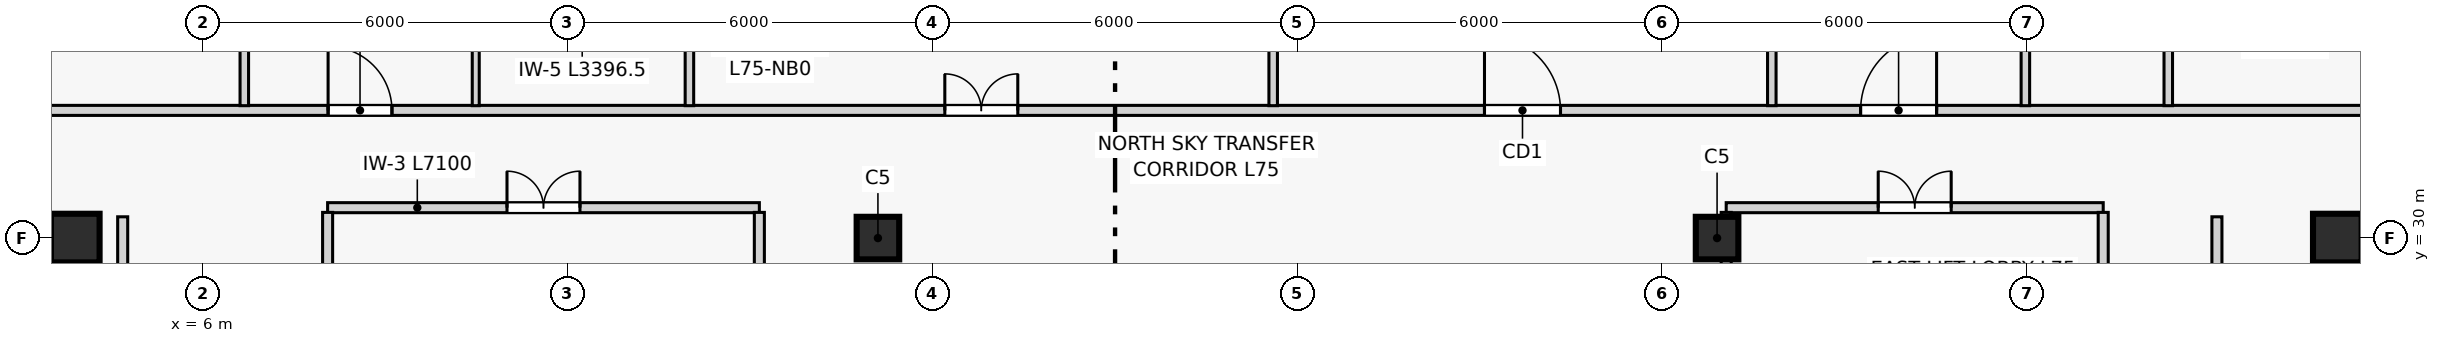
"""IFC4 building model, lengths in metres.
Left out: names, types, materials, properties, quantities, classifications, styles, units other than length and angle.
Written with IfcOpenShell. Run it as: python <this file> out.ifc"""

import sys

from ifc_helpers import new_model, si_unit, direction, frame, frame_2d, origin, origin_2d, place, context, subcontext, project, spatial, rectangle, extrude, source, transform, mapped, element, fill, save


model = new_model("IFC4")
c1 = context("Model", 3, precision=1e-05, world=origin(), true_north=direction((0.0, 1.0)))
c2 = subcontext(c1, "Body", "Model", "MODEL_VIEW")
j1 = project(units=[si_unit("LENGTHUNIT", "METRE"), si_unit("PLANEANGLEUNIT", "RADIAN")], contexts=[c1])
p1 = place(None, origin())
s1 = spatial("IfcSite", under=j1, at=p1, CompositionType="ELEMENT")
p2 = place(p1, origin())
s2 = spatial("IfcBuilding", under=s1, at=p2, CompositionType="ELEMENT")
p3 = place(p2, frame((0.0, 0.0, 285.3)))
s3 = spatial("IfcBuildingStorey", under=s2, at=p3, CompositionType="ELEMENT", Elevation=285.3)
m1 = source(origin(), c2, "Body", "SweptSolid", [
    extrude(rectangle(XDim=0.8, YDim=0.8, at=origin_2d()), origin(), (0.0, 0.0, 1.0), 4.2),
])
for number, where, z_axis, x_axis in (
    (1, (3.9, 30.0, 0.0), (0.0, 0.0, 1.0), (1.0, 0.0, 0.0)),
    (2, (41.1, 30.0, 0.0), (0.0, 0.0, 1.0), (1.0, 0.0, 0.0)),
):
    element("IfcColumn", number, at=place(p3, frame(where, z_axis=z_axis, x_axis=x_axis)), inside=s3, PredefinedType="COLUMN", context=c2, shape_type="MappedRepresentation", body=[
        mapped(m1, transform((0.0, 0.0, 0.0), scale=1.0)),
    ])
m2 = source(origin(), c2, "Body", "SweptSolid", [
    extrude(rectangle(XDim=0.7, YDim=0.7, at=origin_2d()), origin(), (0.0, 0.0, 1.0), 4.2),
])
for number, where, z_axis, x_axis in (
    (3, (17.1, 30.0, 0.0), (0.0, 0.0, 1.0), (1.0, 0.0, 0.0)),
    (4, (30.9, 30.0, 0.0), (0.0, 0.0, 1.0), (1.0, 0.0, 0.0)),
):
    element("IfcColumn", number, at=place(p3, frame(where, z_axis=z_axis, x_axis=x_axis)), inside=s3, PredefinedType="COLUMN", context=c2, shape_type="MappedRepresentation", body=[
        mapped(m2, transform((0.0, 0.0, 0.0), scale=1.0)),
    ])
p4 = place(p3, frame((8.05, 30.5, 0.0), z_axis=(0.0, 0.0, 1.0), x_axis=(1.0, 0.0, 0.0)))
e5 = element("IfcWall", 5, at=p4, inside=s3, PredefinedType="PARTITIONING", context=c2, shape_type="SweptSolid", body=[
    extrude(rectangle(XDim=7.1, YDim=0.165, at=frame_2d((3.55, 0.0))), origin(), (0.0, 0.0, 1.0), 3.92),
])
p5 = place(p4, frame((2.95, 0.0, 0.0)))
e6 = element("IfcOpeningElement", 6, at=p5, cuts=e5, PredefinedType="OPENING", context=c2, shape_type="SweptSolid", body=[
    extrude(rectangle(XDim=1.2, YDim=2.2, at=frame_2d((0.6, 1.1))), frame((0.0, 0.093, 0.0), z_axis=(0.0, -1.0, 0.0), x_axis=(1.0, 0.0, 0.0)), (0.0, 0.0, 1.0), 0.185),
])
for number, where, z_axis, x_axis in (
    (7, (8.05, 27.27, 0.0), (0.0, 0.0, 1.0), (0.0, 1.0, 0.0)),
    (8, (15.15, 27.27, 0.0), (0.0, 0.0, 1.0), (0.0, 1.0, 0.0)),
):
    element("IfcWall", number, at=place(p3, frame(where, z_axis=z_axis, x_axis=x_axis)), inside=s3, PredefinedType="PARTITIONING", context=c2, shape_type="SweptSolid", body=[
        extrude(rectangle(XDim=3.153, YDim=0.165, at=frame_2d((1.576, 0.0))), origin(), (0.0, 0.0, 1.0), 3.92),
    ])
p6 = place(p3, frame((31.05, 30.5, 0.0), z_axis=(0.0, 0.0, 1.0), x_axis=(1.0, 0.0, 0.0)))
e9 = element("IfcWall", 9, at=p6, inside=s3, PredefinedType="PARTITIONING", context=c2, shape_type="SweptSolid", body=[
    extrude(rectangle(XDim=6.2, YDim=0.165, at=frame_2d((3.1, 0.0))), origin(), (0.0, 0.0, 1.0), 3.92),
])
p7 = place(p6, frame((2.5, 0.0, 0.0)))
e10 = element("IfcOpeningElement", 10, at=p7, cuts=e9, PredefinedType="OPENING", context=c2, shape_type="SweptSolid", body=[
    extrude(rectangle(XDim=1.2, YDim=2.2, at=frame_2d((0.6, 1.1))), frame((0.0, 0.093, 0.0), z_axis=(0.0, -1.0, 0.0), x_axis=(1.0, 0.0, 0.0)), (0.0, 0.0, 1.0), 0.185),
])
for number, where, z_axis, x_axis in (
    (11, (31.05, 27.27, 0.0), (0.0, 0.0, 1.0), (0.0, 1.0, 0.0)),
    (12, (37.25, 27.27, 0.0), (0.0, 0.0, 1.0), (0.0, 1.0, 0.0)),
):
    element("IfcWall", number, at=place(p3, frame(where, z_axis=z_axis, x_axis=x_axis)), inside=s3, PredefinedType="PARTITIONING", context=c2, shape_type="SweptSolid", body=[
        extrude(rectangle(XDim=3.153, YDim=0.165, at=frame_2d((1.576, 0.0))), origin(), (0.0, 0.0, 1.0), 3.92),
    ])
p8 = place(p3, frame((3.145, 32.1, 0.0), z_axis=(0.0, 0.0, 1.0), x_axis=(1.0, 0.0, 0.0)))
e13 = element("IfcWall", 13, at=p8, inside=s3, PredefinedType="PARTITIONING", context=c2, shape_type="SweptSolid", body=[
    extrude(rectangle(XDim=38.71, YDim=0.165, at=frame_2d((19.355, 0.0))), origin(), (0.0, 0.0, 1.0), 3.92),
])
p9 = place(p8, frame((4.913, 0.0, 0.0)))
e14 = element("IfcOpeningElement", 14, at=p9, cuts=e13, PredefinedType="OPENING", context=c2, shape_type="SweptSolid", body=[
    extrude(rectangle(XDim=1.05, YDim=2.15, at=frame_2d((0.525, 1.075))), frame((0.0, 0.093, 0.0), z_axis=(0.0, -1.0, 0.0), x_axis=(1.0, 0.0, 0.0)), (0.0, 0.0, 1.0), 0.185),
])
p10 = place(p8, frame((15.055, 0.0, 0.0)))
e15 = element("IfcOpeningElement", 15, at=p10, cuts=e13, PredefinedType="OPENING", context=c2, shape_type="SweptSolid", body=[
    extrude(rectangle(XDim=1.2, YDim=2.2, at=frame_2d((0.6, 1.1))), frame((0.0, 0.093, 0.0), z_axis=(0.0, -1.0, 0.0), x_axis=(1.0, 0.0, 0.0)), (0.0, 0.0, 1.0), 0.185),
])
p11 = place(p8, frame((23.93, 0.0, 0.0)))
e16 = element("IfcOpeningElement", 16, at=p11, cuts=e13, PredefinedType="OPENING", context=c2, shape_type="SweptSolid", body=[
    extrude(rectangle(XDim=1.25, YDim=2.2, at=frame_2d((0.625, 1.1))), frame((0.0, 0.093, 0.0), z_axis=(0.0, -1.0, 0.0), x_axis=(1.0, 0.0, 0.0)), (0.0, 0.0, 1.0), 0.185),
])
p12 = place(p8, frame((30.115, 0.0, 0.0)))
e17 = element("IfcOpeningElement", 17, at=p12, cuts=e13, PredefinedType="OPENING", context=c2, shape_type="SweptSolid", body=[
    extrude(rectangle(XDim=1.25, YDim=2.2, at=frame_2d((0.625, 1.1))), frame((0.0, 0.093, 0.0), z_axis=(0.0, -1.0, 0.0), x_axis=(1.0, 0.0, 0.0)), (0.0, 0.0, 1.0), 0.185),
])
p13 = place(p3, frame((4.68, 26.45, 0.0), z_axis=(0.0, 0.0, 1.0), x_axis=(0.0, 1.0, 0.0)))
e18 = element("IfcWall", 18, at=p13, inside=s3, PredefinedType="PARTITIONING", context=c2, shape_type="SweptSolid", body=[
    extrude(rectangle(XDim=3.9, YDim=0.165, at=frame_2d((1.95, 0.0))), origin(), (0.0, 0.0, 1.0), 3.92),
])
p14 = place(p13, frame((1.475, 0.0, 0.0)))
e19 = element("IfcOpeningElement", 19, at=p14, cuts=e18, PredefinedType="OPENING", context=c2, shape_type="SweptSolid", body=[
    extrude(rectangle(XDim=0.95, YDim=2.1, at=frame_2d((0.475, 1.05))), frame((0.0, 0.093, 0.0), z_axis=(0.0, -1.0, 0.0), x_axis=(1.0, 0.0, 0.0)), (0.0, 0.0, 1.0), 0.185),
])
p15 = place(p3, frame((39.12, 11.45, 0.0), z_axis=(0.0, 0.0, 1.0), x_axis=(0.0, 1.0, 0.0)))
e20 = element("IfcWall", 20, at=p15, inside=s3, PredefinedType="PARTITIONING", context=c2, shape_type="SweptSolid", body=[
    extrude(rectangle(XDim=18.9, YDim=0.165, at=frame_2d((9.45, 0.0))), origin(), (0.0, 0.0, 1.0), 3.92),
])
p16 = place(p15, frame((2.05, 0.0, 0.0)))
e21 = element("IfcOpeningElement", 21, at=p16, cuts=e20, PredefinedType="OPENING", context=c2, shape_type="SweptSolid", body=[
    extrude(rectangle(XDim=0.95, YDim=2.1, at=frame_2d((0.475, 1.05))), frame((0.0, 0.093, 0.0), z_axis=(0.0, -1.0, 0.0), x_axis=(1.0, 0.0, 0.0)), (0.0, 0.0, 1.0), 0.185),
])
p17 = place(p3, frame((6.68, 32.177, 0.0), z_axis=(0.0, 0.0, 1.0), x_axis=(0.0, 1.0, 0.0)))
e22 = element("IfcWall", 22, at=p17, inside=s3, PredefinedType="PARTITIONING", context=c2, shape_type="SweptSolid", body=[
    extrude(rectangle(XDim=7.877, YDim=0.14, at=frame_2d((3.939, 0.0))), origin(), (0.0, 0.0, 1.0), 3.92),
])
p18 = place(p3, frame((14.0, 32.177, 0.0), z_axis=(0.0, 0.0, 1.0), x_axis=(0.0, 1.0, 0.0)))
e23 = element("IfcWall", 23, at=p18, inside=s3, PredefinedType="PARTITIONING", context=c2, shape_type="SweptSolid", body=[
    extrude(rectangle(XDim=9.677, YDim=0.14, at=frame_2d((4.839, 0.0))), origin(), (0.0, 0.0, 1.0), 3.92),
])
p19 = place(p3, frame((23.6, 32.177, 0.0), z_axis=(0.0, 0.0, 1.0), x_axis=(0.0, 1.0, 0.0)))
e24 = element("IfcWall", 24, at=p19, inside=s3, PredefinedType="PARTITIONING", context=c2, shape_type="SweptSolid", body=[
    extrude(rectangle(XDim=9.677, YDim=0.14, at=frame_2d((4.839, 0.0))), origin(), (0.0, 0.0, 1.0), 3.07),
])
p20 = place(p3, frame((31.8, 32.177, 0.0), z_axis=(0.0, 0.0, 1.0), x_axis=(0.0, 1.0, 0.0)))
e25 = element("IfcWall", 25, at=p20, inside=s3, PredefinedType="PARTITIONING", context=c2, shape_type="SweptSolid", body=[
    extrude(rectangle(XDim=9.677, YDim=0.14, at=frame_2d((4.839, 0.0))), origin(), (0.0, 0.0, 1.0), 3.92),
])
p21 = place(p3, frame((38.32, 32.177, 0.0), z_axis=(0.0, 0.0, 1.0), x_axis=(0.0, 1.0, 0.0)))
e26 = element("IfcWall", 26, at=p21, inside=s3, PredefinedType="PARTITIONING", context=c2, shape_type="SweptSolid", body=[
    extrude(rectangle(XDim=7.877, YDim=0.14, at=frame_2d((3.939, 0.0))), origin(), (0.0, 0.0, 1.0), 3.92),
])
p22 = place(p3, frame((10.486, 32.177, 0.0), z_axis=(0.0, 0.0, 1.0), x_axis=(0.0, 1.0, 0.0)))
e27 = element("IfcWall", 27, at=p22, inside=s3, PredefinedType="PARTITIONING", context=c2, shape_type="SweptSolid", body=[
    extrude(rectangle(XDim=9.677, YDim=0.115, at=frame_2d((4.839, 0.0))), origin(), (0.0, 0.0, 1.0), 3.92),
])
p23 = place(p22, frame((6.895, 0.0, 0.0)))
e28 = element("IfcOpeningElement", 28, at=p23, cuts=e27, PredefinedType="OPENING", context=c2, shape_type="SweptSolid", body=[
    extrude(rectangle(XDim=0.95, YDim=2.1, at=frame_2d((0.475, 1.05))), frame((0.0, 0.067, 0.0), z_axis=(0.0, -1.0, 0.0), x_axis=(1.0, 0.0, 0.0)), (0.0, 0.0, 1.0), 0.135),
])
p24 = place(p22, frame((3.631, 0.0, 0.0)))
e29 = element("IfcOpeningElement", 29, at=p24, cuts=e27, PredefinedType="OPENING", context=c2, shape_type="SweptSolid", body=[
    extrude(rectangle(XDim=0.9, YDim=2.1, at=frame_2d((0.45, 1.05))), frame((0.0, 0.067, 0.0), z_axis=(0.0, -1.0, 0.0), x_axis=(1.0, 0.0, 0.0)), (0.0, 0.0, 1.0), 0.135),
])
p25 = place(p22, frame((0.973, 0.0, 0.0)))
e30 = element("IfcOpeningElement", 30, at=p25, cuts=e27, PredefinedType="OPENING", context=c2, shape_type="SweptSolid", body=[
    extrude(rectangle(XDim=0.9, YDim=2.1, at=frame_2d((0.45, 1.05))), frame((0.0, 0.067, 0.0), z_axis=(0.0, -1.0, 0.0), x_axis=(1.0, 0.0, 0.0)), (0.0, 0.0, 1.0), 0.135),
])
p26 = place(p3, frame((35.97, 32.177, 0.0), z_axis=(0.0, 0.0, 1.0), x_axis=(0.0, 1.0, 0.0)))
e31 = element("IfcWall", 31, at=p26, inside=s3, PredefinedType="PLUMBINGWALL", context=c2, shape_type="SweptSolid", body=[
    extrude(rectangle(XDim=9.677, YDim=0.14, at=frame_2d((4.839, 0.0))), origin(), (0.0, 0.0, 1.0), 3.07),
])
p27 = place(p26, frame((0.962, 0.0, 0.0)))
e32 = element("IfcOpeningElement", 32, at=p27, cuts=e31, PredefinedType="OPENING", context=c2, shape_type="SweptSolid", body=[
    extrude(rectangle(XDim=0.9, YDim=2.1, at=frame_2d((0.45, 1.05))), frame((0.0, 0.08, 0.0), z_axis=(0.0, -1.0, 0.0), x_axis=(1.0, 0.0, 0.0)), (0.0, 0.0, 1.0), 0.16),
])
p28 = place(p26, frame((5.522, 0.0, 0.0)))
e33 = element("IfcOpeningElement", 33, at=p28, cuts=e31, PredefinedType="OPENING", context=c2, shape_type="SweptSolid", body=[
    extrude(rectangle(XDim=0.9, YDim=2.1, at=frame_2d((0.45, 1.05))), frame((0.0, 0.08, 0.0), z_axis=(0.0, -1.0, 0.0), x_axis=(1.0, 0.0, 0.0)), (0.0, 0.0, 1.0), 0.16),
])
m3 = source(origin(), c2, "Body", "SweptSolid", [
    extrude(rectangle(XDim=1.2, YDim=2.2, at=frame_2d((0.6, 1.1))), frame((0.0, 0.025, 0.0), z_axis=(0.0, -1.0, 0.0), x_axis=(1.0, 0.0, 0.0)), (0.0, 0.0, 1.0), 0.05),
])
p29 = place(p5, origin())
e34 = element("IfcDoor", 34, at=p29, inside=s3, OperationType="DOUBLE_DOOR_SINGLE_SWING", PredefinedType="DOOR", context=c2, shape_type="MappedRepresentation", body=[
    mapped(m3, transform((0.0, 0.0, 0.0), scale=1.0)),
])
fill(e6, e34)
p30 = place(p7, origin())
e35 = element("IfcDoor", 35, at=p30, inside=s3, OperationType="DOUBLE_DOOR_SINGLE_SWING", PredefinedType="DOOR", context=c2, shape_type="MappedRepresentation", body=[
    mapped(m3, transform((0.0, 0.0, 0.0), scale=1.0)),
])
fill(e10, e35)
m4 = source(origin(), c2, "Body", "SweptSolid", [
    extrude(rectangle(XDim=1.05, YDim=2.15, at=frame_2d((0.525, 1.075))), frame((0.0, 0.025, 0.0), z_axis=(0.0, -1.0, 0.0), x_axis=(1.0, 0.0, 0.0)), (0.0, 0.0, 1.0), 0.05),
])
p31 = place(p9, origin())
e36 = element("IfcDoor", 36, at=p31, inside=s3, OperationType="SINGLE_SWING_LEFT", PredefinedType="DOOR", context=c2, shape_type="MappedRepresentation", body=[
    mapped(m4, transform((0.0, 0.0, 0.0), scale=1.0)),
])
fill(e14, e36)
p32 = place(p10, origin())
e37 = element("IfcDoor", 37, at=p32, inside=s3, OperationType="DOUBLE_DOOR_SINGLE_SWING", PredefinedType="DOOR", context=c2, shape_type="MappedRepresentation", body=[
    mapped(m3, transform((0.0, 0.0, 0.0), scale=1.0)),
])
fill(e15, e37)
m5 = source(origin(), c2, "Body", "SweptSolid", [
    extrude(rectangle(XDim=1.25, YDim=2.2, at=frame_2d((0.625, 1.1))), frame((0.0, 0.025, 0.0), z_axis=(0.0, -1.0, 0.0), x_axis=(1.0, 0.0, 0.0)), (0.0, 0.0, 1.0), 0.05),
])
p33 = place(p11, origin())
e38 = element("IfcDoor", 38, at=p33, inside=s3, OperationType="SINGLE_SWING_LEFT", PredefinedType="DOOR", context=c2, shape_type="MappedRepresentation", body=[
    mapped(m5, transform((0.0, 0.0, 0.0), scale=1.0)),
])
fill(e16, e38)
p34 = place(p12, origin())
e39 = element("IfcDoor", 39, at=p34, inside=s3, OperationType="SINGLE_SWING_RIGHT", PredefinedType="DOOR", context=c2, shape_type="MappedRepresentation", body=[
    mapped(m5, transform((0.0, 0.0, 0.0), scale=1.0)),
])
fill(e17, e39)
save(model, sys.argv[1])
